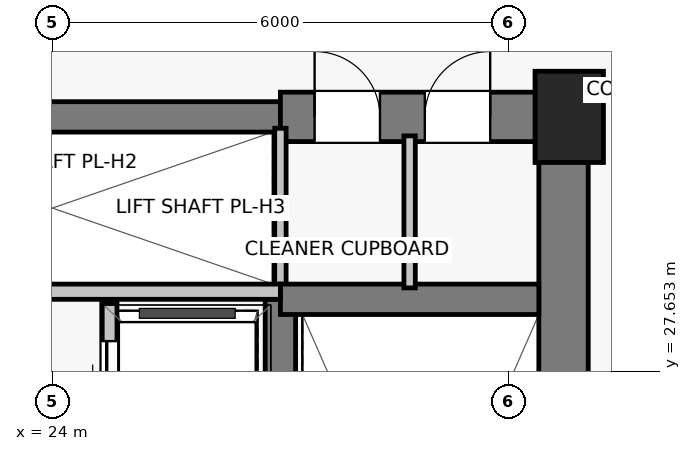
"""IFC4 building model, lengths in metres.
Left out: names, types, materials, properties, quantities, classifications, styles, units other than length and angle.
Written with IfcOpenShell. Run it as: python <this file> out.ifc"""

import sys

from ifc_helpers import new_model, si_unit, direction, frame, frame_2d, origin, origin_2d, place, context, subcontext, project, spatial, rectangle, extrude, source, transform, mapped, element, fill, save


model = new_model("IFC4")
c1 = context("Model", 3, precision=1e-05, world=origin(), true_north=direction((0.0, 1.0)))
c2 = subcontext(c1, "Body", "Model", "MODEL_VIEW")
j1 = project(units=[si_unit("LENGTHUNIT", "METRE"), si_unit("PLANEANGLEUNIT", "RADIAN")], contexts=[c1])
p1 = place(None, origin())
s1 = spatial("IfcSite", under=j1, at=p1, CompositionType="ELEMENT")
p2 = place(p1, origin())
s2 = spatial("IfcBuilding", under=s1, at=p2, CompositionType="ELEMENT")
p3 = place(p2, frame((0.0, 0.0, 136.0)))
s3 = spatial("IfcBuildingStorey", under=s2, at=p3, CompositionType="ELEMENT", Elevation=136.0)
p4 = place(p3, frame((30.8, 31.0, 0.0), z_axis=(0.0, 0.0, 1.0), x_axis=(1.0, 0.0, 0.0)))
e1 = element("IfcColumn", 1, at=p4, inside=s3, PredefinedType="PILASTER", context=c2, shape_type="SweptSolid", body=[
    extrude(rectangle(XDim=0.9, YDim=1.2, at=origin_2d()), origin(), (0.0, 0.0, 1.0), 3.25),
])
p5 = place(p3, frame((30.725, 16.8, 0.0), z_axis=(0.0, 0.0, 1.0), x_axis=(0.0, 1.0, 0.0)))
e2 = element("IfcWall", 2, at=p5, inside=s3, PredefinedType="SHEAR", context=c2, shape_type="SweptSolid", body=[
    extrude(rectangle(XDim=14.2, YDim=0.65, at=frame_2d((7.1, 0.0))), origin(), (0.0, 0.0, 1.0), 3.0),
])
p6 = place(p3, frame((21.0, 31.0, 0.0), z_axis=(0.0, 0.0, 1.0), x_axis=(1.0, 0.0, 0.0)))
e3 = element("IfcWall", 3, at=p6, inside=s3, PredefinedType="SHEAR", context=c2, shape_type="SweptSolid", body=[
    extrude(rectangle(XDim=6.0, YDim=0.4, at=frame_2d((3.0, 0.0))), origin(), (0.0, 0.0, 1.0), 3.0),
])
p7 = place(p3, frame((27.0, 31.0, 0.0), z_axis=(0.0, 0.0, 1.0), x_axis=(1.0, 0.0, 0.0)))
e4 = element("IfcWall", 4, at=p7, inside=s3, PredefinedType="SHEAR", context=c2, shape_type="SweptSolid", body=[
    extrude(rectangle(XDim=3.8, YDim=0.65, at=frame_2d((1.9, 0.0))), origin(), (0.0, 0.0, 1.0), 3.0),
])
p8 = place(p7, frame((0.45, 0.0, 0.0)))
e5 = element("IfcOpeningElement", 5, at=p8, cuts=e4, PredefinedType="OPENING", context=c2, shape_type="SweptSolid", body=[
    extrude(rectangle(XDim=0.86, YDim=2.01, at=frame_2d((0.43, 1.005))), frame((0.0, 0.335, 0.0), z_axis=(0.0, -1.0, 0.0), x_axis=(1.0, 0.0, 0.0)), (0.0, 0.0, 1.0), 0.67),
])
p9 = place(p7, frame((1.9, 0.0, 0.0)))
e6 = element("IfcOpeningElement", 6, at=p9, cuts=e4, PredefinedType="OPENING", context=c2, shape_type="SweptSolid", body=[
    extrude(rectangle(XDim=0.86, YDim=2.01, at=frame_2d((0.43, 1.005))), frame((0.0, 0.335, 0.0), z_axis=(0.0, -1.0, 0.0), x_axis=(1.0, 0.0, 0.0)), (0.0, 0.0, 1.0), 0.67),
])
p10 = place(p3, frame((27.0, 28.65, 0.0), z_axis=(0.0, 0.0, 1.0), x_axis=(0.0, 1.0, 0.0)))
e7 = element("IfcWall", 7, at=p10, inside=s3, PredefinedType="PARTITIONING", context=c2, shape_type="SweptSolid", body=[
    extrude(rectangle(XDim=2.2, YDim=0.15, at=frame_2d((1.1, 0.0))), origin(), (0.0, 0.0, 1.0), 3.0),
])
p11 = place(p3, frame((27.0, 19.8, 0.0), z_axis=(0.0, 0.0, 1.0), x_axis=(0.0, 1.0, 0.0)))
e8 = element("IfcWall", 8, at=p11, inside=s3, PredefinedType="SHEAR", context=c2, shape_type="SweptSolid", body=[
    extrude(rectangle(XDim=8.8, YDim=0.4, at=frame_2d((4.4, 0.0))), origin(), (0.0, 0.0, 1.0), 3.0),
])
p12 = place(p3, frame((27.0, 28.6, 0.0), z_axis=(0.0, 0.0, 1.0), x_axis=(1.0, 0.0, 0.0)))
e9 = element("IfcWall", 9, at=p12, inside=s3, PredefinedType="SHEAR", context=c2, shape_type="SweptSolid", body=[
    extrude(rectangle(XDim=3.4, YDim=0.4, at=frame_2d((1.7, 0.0))), origin(), (0.0, 0.0, 1.0), 3.0),
])
p13 = place(p3, frame((21.0, 28.7, 0.0), z_axis=(0.0, 0.0, 1.0), x_axis=(1.0, 0.0, 0.0)))
e10 = element("IfcWall", 10, at=p13, inside=s3, PredefinedType="SOLIDWALL", context=c2, shape_type="SweptSolid", body=[
    extrude(rectangle(XDim=6.0, YDim=0.2, at=frame_2d((3.0, 0.0))), origin(), (0.0, 0.0, 1.0), 3.0),
])
p14 = place(p3, frame((24.75, 22.6, 0.0), z_axis=(0.0, 0.0, 1.0), x_axis=(0.0, 1.0, 0.0)))
e11 = element("IfcWall", 11, at=p14, inside=s3, PredefinedType="SOLIDWALL", context=c2, shape_type="SweptSolid", body=[
    extrude(rectangle(XDim=5.95, YDim=0.2, at=frame_2d((2.975, 0.0))), origin(), (0.0, 0.0, 1.0), 3.0),
])
p15 = place(p14, frame((0.45, 0.0, 0.0)))
e12 = element("IfcOpeningElement", 12, at=p15, cuts=e11, PredefinedType="OPENING", context=c2, shape_type="SweptSolid", body=[
    extrude(rectangle(XDim=1.1, YDim=2.08, at=frame_2d((0.55, 1.04))), frame((0.0, 0.11, 0.0), z_axis=(0.0, -1.0, 0.0), x_axis=(1.0, 0.0, 0.0)), (0.0, 0.0, 1.0), 0.22),
])
p16 = place(p14, frame((2.4, 0.0, 0.0)))
e13 = element("IfcOpeningElement", 13, at=p16, cuts=e11, PredefinedType="OPENING", context=c2, shape_type="SweptSolid", body=[
    extrude(rectangle(XDim=1.1, YDim=2.08, at=frame_2d((0.55, 1.04))), frame((0.0, 0.11, 0.0), z_axis=(0.0, -1.0, 0.0), x_axis=(1.0, 0.0, 0.0)), (0.0, 0.0, 1.0), 0.22),
])
p17 = place(p14, frame((4.35, 0.0, 0.0)))
e14 = element("IfcOpeningElement", 14, at=p17, cuts=e11, PredefinedType="OPENING", context=c2, shape_type="SweptSolid", body=[
    extrude(rectangle(XDim=1.1, YDim=2.08, at=frame_2d((0.55, 1.04))), frame((0.0, 0.11, 0.0), z_axis=(0.0, -1.0, 0.0), x_axis=(1.0, 0.0, 0.0)), (0.0, 0.0, 1.0), 0.22),
])
p18 = place(p3, frame((28.7, 28.75, 0.0), z_axis=(0.0, 0.0, 1.0), x_axis=(0.0, 1.0, 0.0)))
e15 = element("IfcWall", 15, at=p18, inside=s3, PredefinedType="PARTITIONING", context=c2, shape_type="SweptSolid", body=[
    extrude(rectangle(XDim=2.0, YDim=0.15, at=frame_2d((1.0, 0.0))), origin(), (0.0, 0.0, 1.0), 3.0),
])
m1 = source(origin(), c2, "Body", "SweptSolid", [
    extrude(rectangle(XDim=0.86, YDim=2.01, at=frame_2d((0.43, 1.005))), frame((0.0, 0.025, 0.0), z_axis=(0.0, -1.0, 0.0), x_axis=(1.0, 0.0, 0.0)), (0.0, 0.0, 1.0), 0.05),
])
p19 = place(p8, origin())
e16 = element("IfcDoor", 16, at=p19, inside=s3, OperationType="SINGLE_SWING_LEFT", PredefinedType="DOOR", context=c2, shape_type="MappedRepresentation", body=[
    mapped(m1, transform((0.0, 0.0, 0.0), scale=1.0)),
])
fill(e5, e16)
p20 = place(p9, origin())
e17 = element("IfcDoor", 17, at=p20, inside=s3, OperationType="SINGLE_SWING_RIGHT", PredefinedType="DOOR", context=c2, shape_type="MappedRepresentation", body=[
    mapped(m1, transform((0.0, 0.0, 0.0), scale=1.0)),
])
fill(e6, e17)
m2 = source(origin(), c2, "Body", "SweptSolid", [
    extrude(rectangle(XDim=1.1, YDim=2.08, at=frame_2d((0.55, 1.04))), frame((0.0, 0.025, 0.0), z_axis=(0.0, -1.0, 0.0), x_axis=(1.0, 0.0, 0.0)), (0.0, 0.0, 1.0), 0.05),
])
p21 = place(p17, origin())
e18 = element("IfcDoor", 18, at=p21, inside=s3, OperationType="SLIDING_TO_LEFT", PredefinedType="DOOR", context=c2, shape_type="MappedRepresentation", body=[
    mapped(m2, transform((0.0, 0.0, 0.0), scale=1.0)),
])
fill(e14, e18)
save(model, sys.argv[1])
